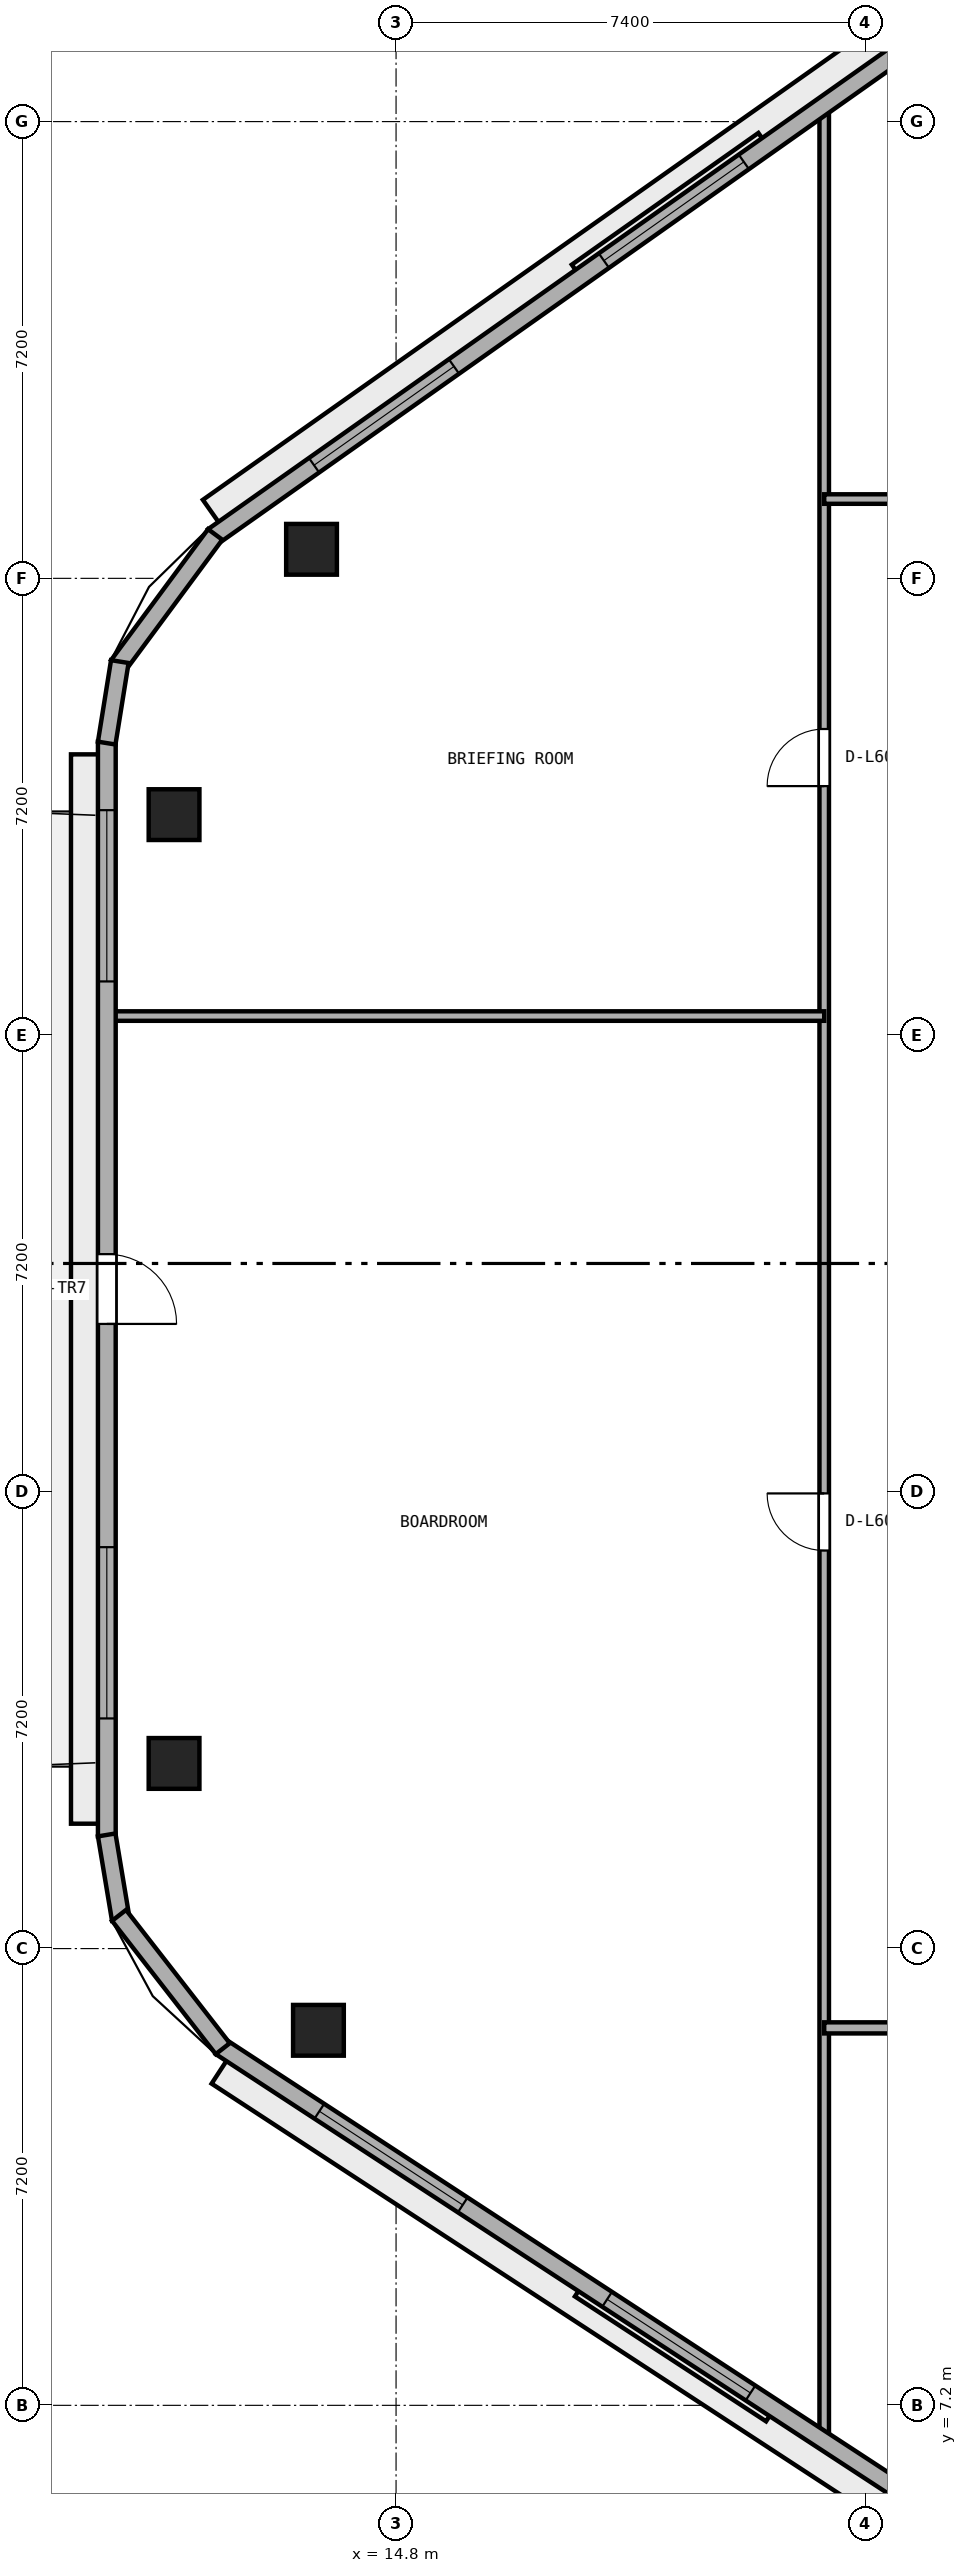
"""IFC4 building model, lengths in metres.
Left out: names, types, materials, properties, quantities, classifications, styles, units other than length and angle.
Written with IfcOpenShell. Run it as: python <this file> out.ifc"""

import sys

from ifc_helpers import new_model, si_unit, direction, frame, frame_2d, origin, origin_2d, place, context, subcontext, project, spatial, rectangle, extrude, element, fill, save


model = new_model("IFC4")
c1 = context("Model", 3, precision=1e-05, world=origin(), true_north=direction((0.0, 1.0)))
c2 = subcontext(c1, "Body", "Model", "MODEL_VIEW")
j1 = project(units=[si_unit("LENGTHUNIT", "METRE"), si_unit("PLANEANGLEUNIT", "RADIAN")], contexts=[c1])
p1 = place(None, origin())
s1 = spatial("IfcSite", under=j1, at=p1, CompositionType="ELEMENT")
p2 = place(p1, origin())
s2 = spatial("IfcBuilding", under=s1, at=p2, CompositionType="ELEMENT")
p3 = place(p2, frame((0.0, 0.0, 236.4)))
s3 = spatial("IfcBuildingStorey", under=s2, at=p3, CompositionType="ELEMENT", Elevation=236.4)
for number, where, z_axis, x_axis in (
    (1, (13.467, 36.458, 0.0), (0.0, 0.0, 1.0), (1.0, 0.0, 0.0)),
    (2, (11.3, 32.275, 0.0), (0.0, 0.0, 1.0), (1.0, 0.0, 0.0)),
    (3, (11.3, 17.319, 0.0), (0.0, 0.0, 1.0), (1.0, 0.0, 0.0)),
    (4, (13.576, 13.112, 0.0), (0.0, 0.0, 1.0), (1.0, 0.0, 0.0)),
):
    element("IfcColumn", number, at=place(p3, frame(where, z_axis=z_axis, x_axis=x_axis)), inside=s3, PredefinedType="COLUMN", context=c2, shape_type="SweptSolid", body=[
        extrude(rectangle(XDim=0.8, YDim=0.8, at=origin_2d()), origin(), (0.0, 0.0, 1.0), 3.8),
    ])
p4 = place(p3, frame((21.55, 6.608, 0.0), z_axis=(0.0, 0.0, 1.0), x_axis=(0.0, 1.0, 0.0)))
e5 = element("IfcWall", 5, at=p4, inside=s3, PredefinedType="PARTITIONING", context=c2, shape_type="SweptSolid", body=[
    extrude(rectangle(XDim=36.883, YDim=0.15, at=frame_2d((18.441, 0.0))), origin(), (0.0, 0.0, 1.0), 3.51),
])
p5 = place(p4, frame((14.067, 0.0, 0.0)))
e6 = element("IfcOpeningElement", 6, at=p5, cuts=e5, PredefinedType="OPENING", context=c2, shape_type="SweptSolid", body=[
    extrude(rectangle(XDim=0.9, YDim=2.1, at=frame_2d((0.45, 1.05))), frame((0.0, 0.085, 0.0), z_axis=(0.0, -1.0, 0.0), x_axis=(1.0, 0.0, 0.0)), (0.0, 0.0, 1.0), 0.17),
])
p6 = place(p4, frame((26.117, 0.0, 0.0)))
e7 = element("IfcOpeningElement", 7, at=p6, cuts=e5, PredefinedType="OPENING", context=c2, shape_type="SweptSolid", body=[
    extrude(rectangle(XDim=0.9, YDim=2.1, at=frame_2d((0.45, 1.05))), frame((0.0, 0.085, 0.0), z_axis=(0.0, -1.0, 0.0), x_axis=(1.0, 0.0, 0.0)), (0.0, 0.0, 1.0), 0.17),
])
p7 = place(p3, frame((21.55, 13.15, 0.0), z_axis=(0.0, 0.0, 1.0), x_axis=(1.0, 0.0, 0.0)))
e8 = element("IfcWall", 8, at=p7, inside=s3, PredefinedType="PARTITIONING", context=c2, shape_type="SweptSolid", body=[
    extrude(rectangle(XDim=14.1, YDim=0.175, at=frame_2d((7.05, 0.0))), origin(), (0.0, 0.0, 1.0), 3.51),
])
p8 = place(p7, frame((6.6, 0.0, 0.0)))
e9 = element("IfcOpeningElement", 9, at=p8, cuts=e8, PredefinedType="OPENING", context=c2, shape_type="SweptSolid", body=[
    extrude(rectangle(XDim=0.9, YDim=2.1, at=frame_2d((0.45, 1.05))), frame((0.0, 0.097, 0.0), z_axis=(0.0, -1.0, 0.0), x_axis=(1.0, 0.0, 0.0)), (0.0, 0.0, 1.0), 0.195),
])
p9 = place(p3, frame((10.305, 29.1, 0.0), z_axis=(0.0, 0.0, 1.0), x_axis=(1.0, 0.0, 0.0)))
e10 = element("IfcWall", 10, at=p9, inside=s3, PredefinedType="PARTITIONING", context=c2, shape_type="SweptSolid", body=[
    extrude(rectangle(XDim=11.245, YDim=0.15, at=frame_2d((5.623, 0.0))), origin(), (0.0, 0.0, 1.0), 3.51),
])
p10 = place(p3, frame((21.55, 37.25, 0.0), z_axis=(0.0, 0.0, 1.0), x_axis=(1.0, 0.0, 0.0)))
e11 = element("IfcWall", 11, at=p10, inside=s3, PredefinedType="PARTITIONING", context=c2, shape_type="SweptSolid", body=[
    extrude(rectangle(XDim=27.05, YDim=0.15, at=frame_2d((13.525, 0.0))), origin(), (0.0, 0.0, 1.0), 3.51),
])
p11 = place(p10, frame((4.795, 0.0, 0.0)))
e12 = element("IfcOpeningElement", 12, at=p11, cuts=e11, PredefinedType="OPENING", context=c2, shape_type="SweptSolid", body=[
    extrude(rectangle(XDim=1.0, YDim=2.12, at=frame_2d((0.5, 1.06))), frame((0.0, 0.085, 0.0), z_axis=(0.0, -1.0, 0.0), x_axis=(1.0, 0.0, 0.0)), (0.0, 0.0, 1.0), 0.17),
])
p12 = place(p10, frame((15.6, 0.0, 0.0)))
e13 = element("IfcOpeningElement", 13, at=p12, cuts=e11, PredefinedType="OPENING", context=c2, shape_type="SweptSolid", body=[
    extrude(rectangle(XDim=1.0, YDim=2.12, at=frame_2d((0.5, 1.06))), frame((0.0, 0.085, 0.0), z_axis=(0.0, -1.0, 0.0), x_axis=(1.0, 0.0, 0.0)), (0.0, 0.0, 1.0), 0.17),
])
p13 = place(p10, frame((23.88, 0.0, 0.0)))
e14 = element("IfcOpeningElement", 14, at=p13, cuts=e11, PredefinedType="OPENING", context=c2, shape_type="SweptSolid", body=[
    extrude(rectangle(XDim=0.9, YDim=2.1, at=frame_2d((0.45, 1.05))), frame((0.0, 0.085, 0.0), z_axis=(0.0, -1.0, 0.0), x_axis=(1.0, 0.0, 0.0)), (0.0, 0.0, 1.0), 0.17),
])
p14 = place(p3, frame((26.443, 46.913, 0.0), z_axis=(0.0, 0.0, 1.0), x_axis=(-0.817024179766, -0.576603407619, 0.0)))
e15 = element("IfcWall", 15, at=p14, inside=s3, PredefinedType="STANDARD", context=c2, shape_type="SweptSolid", body=[
    extrude(rectangle(XDim=17.78, YDim=0.28, at=frame_2d((8.89, 0.0))), origin(), (0.0, 0.0, 1.0), 3.51),
])
p15 = place(p14, frame((1.947, 0.0, 0.9)))
e16 = element("IfcOpeningElement", 16, at=p15, cuts=e15, PredefinedType="OPENING", context=c2, shape_type="SweptSolid", body=[
    extrude(rectangle(XDim=2.7, YDim=1.75, at=frame_2d((1.35, 0.875))), frame((0.0, 0.15, 0.0), z_axis=(0.0, -1.0, 0.0), x_axis=(1.0, 0.0, 0.0)), (0.0, 0.0, 1.0), 0.3),
])
p16 = place(p14, frame((7.54, 0.0, 0.9)))
e17 = element("IfcOpeningElement", 17, at=p16, cuts=e15, PredefinedType="OPENING", context=c2, shape_type="SweptSolid", body=[
    extrude(rectangle(XDim=2.7, YDim=1.75, at=frame_2d((1.35, 0.875))), frame((0.0, 0.15, 0.0), z_axis=(0.0, -1.0, 0.0), x_axis=(1.0, 0.0, 0.0)), (0.0, 0.0, 1.0), 0.3),
])
p17 = place(p14, frame((13.133, 0.0, 0.9)))
e18 = element("IfcOpeningElement", 18, at=p17, cuts=e15, PredefinedType="OPENING", context=c2, shape_type="SweptSolid", body=[
    extrude(rectangle(XDim=2.7, YDim=1.75, at=frame_2d((1.35, 0.875))), frame((0.0, 0.15, 0.0), z_axis=(0.0, -1.0, 0.0), x_axis=(1.0, 0.0, 0.0)), (0.0, 0.0, 1.0), 0.3),
])
p18 = place(p3, frame((10.24, 33.425, 0.0), z_axis=(0.0, 0.0, 1.0), x_axis=(0.0, -1.0, 0.0)))
e19 = element("IfcWall", 19, at=p18, inside=s3, PredefinedType="STANDARD", context=c2, shape_type="SweptSolid", body=[
    extrude(rectangle(XDim=17.257, YDim=0.28, at=frame_2d((8.628, 0.0))), origin(), (0.0, 0.0, 1.0), 3.51),
])
p19 = place(p18, frame((8.078, 0.0, 0.0)))
e20 = element("IfcOpeningElement", 20, at=p19, cuts=e19, PredefinedType="OPENING", context=c2, shape_type="SweptSolid", body=[
    extrude(rectangle(XDim=1.1, YDim=2.2, at=frame_2d((0.55, 1.1))), frame((0.0, 0.15, 0.0), z_axis=(0.0, -1.0, 0.0), x_axis=(1.0, 0.0, 0.0)), (0.0, 0.0, 1.0), 0.3),
])
p20 = place(p18, frame((1.079, 0.0, 0.9)))
e21 = element("IfcOpeningElement", 21, at=p20, cuts=e19, PredefinedType="OPENING", context=c2, shape_type="SweptSolid", body=[
    extrude(rectangle(XDim=2.7, YDim=1.75, at=frame_2d((1.35, 0.875))), frame((0.0, 0.15, 0.0), z_axis=(0.0, -1.0, 0.0), x_axis=(1.0, 0.0, 0.0)), (0.0, 0.0, 1.0), 0.3),
])
p21 = place(p18, frame((12.697, 0.0, 0.9)))
e22 = element("IfcOpeningElement", 22, at=p21, cuts=e19, PredefinedType="OPENING", context=c2, shape_type="SweptSolid", body=[
    extrude(rectangle(XDim=2.7, YDim=1.75, at=frame_2d((1.35, 0.875))), frame((0.0, 0.15, 0.0), z_axis=(0.0, -1.0, 0.0), x_axis=(1.0, 0.0, 0.0)), (0.0, 0.0, 1.0), 0.3),
])
p22 = place(p3, frame((12.034, 12.854, 0.0), z_axis=(0.0, 0.0, 1.0), x_axis=(0.837118352984, -0.547021812269, 0.0)))
e23 = element("IfcWall", 23, at=p22, inside=s3, PredefinedType="STANDARD", context=c2, shape_type="SweptSolid", body=[
    extrude(rectangle(XDim=17.259, YDim=0.28, at=frame_2d((8.63, 0.0))), origin(), (0.0, 0.0, 1.0), 3.51),
])
p23 = place(p22, frame((1.86, 0.0, 0.9)))
e24 = element("IfcOpeningElement", 24, at=p23, cuts=e23, PredefinedType="OPENING", context=c2, shape_type="SweptSolid", body=[
    extrude(rectangle(XDim=2.7, YDim=1.75, at=frame_2d((1.35, 0.875))), frame((0.0, 0.15, 0.0), z_axis=(0.0, -1.0, 0.0), x_axis=(1.0, 0.0, 0.0)), (0.0, 0.0, 1.0), 0.3),
])
p24 = place(p22, frame((7.28, 0.0, 0.9)))
e25 = element("IfcOpeningElement", 25, at=p24, cuts=e23, PredefinedType="OPENING", context=c2, shape_type="SweptSolid", body=[
    extrude(rectangle(XDim=2.7, YDim=1.75, at=frame_2d((1.35, 0.875))), frame((0.0, 0.15, 0.0), z_axis=(0.0, -1.0, 0.0), x_axis=(1.0, 0.0, 0.0)), (0.0, 0.0, 1.0), 0.3),
])
p25 = place(p22, frame((12.699, 0.0, 0.9)))
e26 = element("IfcOpeningElement", 26, at=p25, cuts=e23, PredefinedType="OPENING", context=c2, shape_type="SweptSolid", body=[
    extrude(rectangle(XDim=2.7, YDim=1.75, at=frame_2d((1.35, 0.875))), frame((0.0, 0.15, 0.0), z_axis=(0.0, -1.0, 0.0), x_axis=(1.0, 0.0, 0.0)), (0.0, 0.0, 1.0), 0.3),
])
p26 = place(p3, frame((11.948, 36.692, 0.0), z_axis=(0.0, 0.0, 1.0), x_axis=(-0.595170751493, -0.803599263668, 0.0)))
e27 = element("IfcWall", 27, at=p26, inside=s3, PredefinedType="STANDARD", context=c2, shape_type="SweptSolid", body=[
    extrude(rectangle(XDim=2.57, YDim=0.28, at=frame_2d((1.285, 0.0))), origin(), (0.0, 0.0, 1.0), 3.51),
])
p27 = place(p3, frame((10.445, 34.688, 0.0), z_axis=(0.0, 0.0, 1.0), x_axis=(-0.158524605336, -0.987355027081, 0.0)))
e28 = element("IfcWall", 28, at=p27, inside=s3, PredefinedType="STANDARD", context=c2, shape_type="SweptSolid", body=[
    extrude(rectangle(XDim=1.301, YDim=0.28, at=frame_2d((0.651, 0.0))), origin(), (0.0, 0.0, 1.0), 3.51),
])
p28 = place(p3, frame((10.238, 16.192, 0.0), z_axis=(0.0, 0.0, 1.0), x_axis=(0.164604311367, -0.986359681191, 0.0)))
e29 = element("IfcWall", 29, at=p28, inside=s3, PredefinedType="STANDARD", context=c2, shape_type="SweptSolid", body=[
    extrude(rectangle(XDim=1.35, YDim=0.28, at=frame_2d((0.675, 0.0))), origin(), (0.0, 0.0, 1.0), 3.51),
])
p29 = place(p3, frame((10.433, 14.923, 0.0), z_axis=(0.0, 0.0, 1.0), x_axis=(0.614181852676, -0.78916452774, 0.0)))
e30 = element("IfcWall", 30, at=p29, inside=s3, PredefinedType="STANDARD", context=c2, shape_type="SweptSolid", body=[
    extrude(rectangle(XDim=2.662, YDim=0.28, at=frame_2d((1.331, 0.0))), origin(), (0.0, 0.0, 1.0), 3.51),
])
p30 = place(p5, origin())
e31 = element("IfcDoor", 31, at=p30, inside=s3, OperationType="SINGLE_SWING_RIGHT", PredefinedType="DOOR", context=c2, shape_type="SweptSolid", body=[
    extrude(rectangle(XDim=0.9, YDim=2.1, at=frame_2d((0.45, 1.05))), frame((0.0, 0.025, 0.0), z_axis=(0.0, -1.0, 0.0), x_axis=(1.0, 0.0, 0.0)), (0.0, 0.0, 1.0), 0.05),
])
fill(e6, e31)
p31 = place(p6, origin())
e32 = element("IfcDoor", 32, at=p31, inside=s3, OperationType="SINGLE_SWING_LEFT", PredefinedType="DOOR", context=c2, shape_type="SweptSolid", body=[
    extrude(rectangle(XDim=0.9, YDim=2.1, at=frame_2d((0.45, 1.05))), frame((0.0, 0.025, 0.0), z_axis=(0.0, -1.0, 0.0), x_axis=(1.0, 0.0, 0.0)), (0.0, 0.0, 1.0), 0.05),
])
fill(e7, e32)
p32 = place(p16, origin())
e33 = element("IfcWindow", 33, at=p32, inside=s3, PartitioningType="SINGLE_PANEL", PredefinedType="WINDOW", context=c2, shape_type="SweptSolid", body=[
    extrude(rectangle(XDim=2.7, YDim=1.75, at=frame_2d((1.35, 0.875))), frame((0.0, 0.03, 0.0), z_axis=(0.0, -1.0, 0.0), x_axis=(1.0, 0.0, 0.0)), (0.0, 0.0, 1.0), 0.06),
])
fill(e17, e33)
p33 = place(p17, origin())
e34 = element("IfcWindow", 34, at=p33, inside=s3, PartitioningType="SINGLE_PANEL", PredefinedType="WINDOW", context=c2, shape_type="SweptSolid", body=[
    extrude(rectangle(XDim=2.7, YDim=1.75, at=frame_2d((1.35, 0.875))), frame((0.0, 0.03, 0.0), z_axis=(0.0, -1.0, 0.0), x_axis=(1.0, 0.0, 0.0)), (0.0, 0.0, 1.0), 0.06),
])
fill(e18, e34)
p34 = place(p19, origin())
e35 = element("IfcDoor", 35, at=p34, inside=s3, OperationType="SINGLE_SWING_RIGHT", PredefinedType="DOOR", context=c2, shape_type="SweptSolid", body=[
    extrude(rectangle(XDim=1.1, YDim=2.2, at=frame_2d((0.55, 1.1))), frame((0.0, 0.025, 0.0), z_axis=(0.0, -1.0, 0.0), x_axis=(1.0, 0.0, 0.0)), (0.0, 0.0, 1.0), 0.05),
])
fill(e20, e35)
p35 = place(p20, origin())
e36 = element("IfcWindow", 36, at=p35, inside=s3, PartitioningType="SINGLE_PANEL", PredefinedType="WINDOW", context=c2, shape_type="SweptSolid", body=[
    extrude(rectangle(XDim=2.7, YDim=1.75, at=frame_2d((1.35, 0.875))), frame((0.0, 0.03, 0.0), z_axis=(0.0, -1.0, 0.0), x_axis=(1.0, 0.0, 0.0)), (0.0, 0.0, 1.0), 0.06),
])
fill(e21, e36)
p36 = place(p21, origin())
e37 = element("IfcWindow", 37, at=p36, inside=s3, PartitioningType="SINGLE_PANEL", PredefinedType="WINDOW", context=c2, shape_type="SweptSolid", body=[
    extrude(rectangle(XDim=2.7, YDim=1.75, at=frame_2d((1.35, 0.875))), frame((0.0, 0.03, 0.0), z_axis=(0.0, -1.0, 0.0), x_axis=(1.0, 0.0, 0.0)), (0.0, 0.0, 1.0), 0.06),
])
fill(e22, e37)
p37 = place(p23, origin())
e38 = element("IfcWindow", 38, at=p37, inside=s3, PartitioningType="SINGLE_PANEL", PredefinedType="WINDOW", context=c2, shape_type="SweptSolid", body=[
    extrude(rectangle(XDim=2.7, YDim=1.75, at=frame_2d((1.35, 0.875))), frame((0.0, 0.03, 0.0), z_axis=(0.0, -1.0, 0.0), x_axis=(1.0, 0.0, 0.0)), (0.0, 0.0, 1.0), 0.06),
])
fill(e24, e38)
p38 = place(p24, origin())
e39 = element("IfcWindow", 39, at=p38, inside=s3, PartitioningType="SINGLE_PANEL", PredefinedType="WINDOW", context=c2, shape_type="SweptSolid", body=[
    extrude(rectangle(XDim=2.7, YDim=1.75, at=frame_2d((1.35, 0.875))), frame((0.0, 0.03, 0.0), z_axis=(0.0, -1.0, 0.0), x_axis=(1.0, 0.0, 0.0)), (0.0, 0.0, 1.0), 0.06),
])
fill(e25, e39)
save(model, sys.argv[1])
